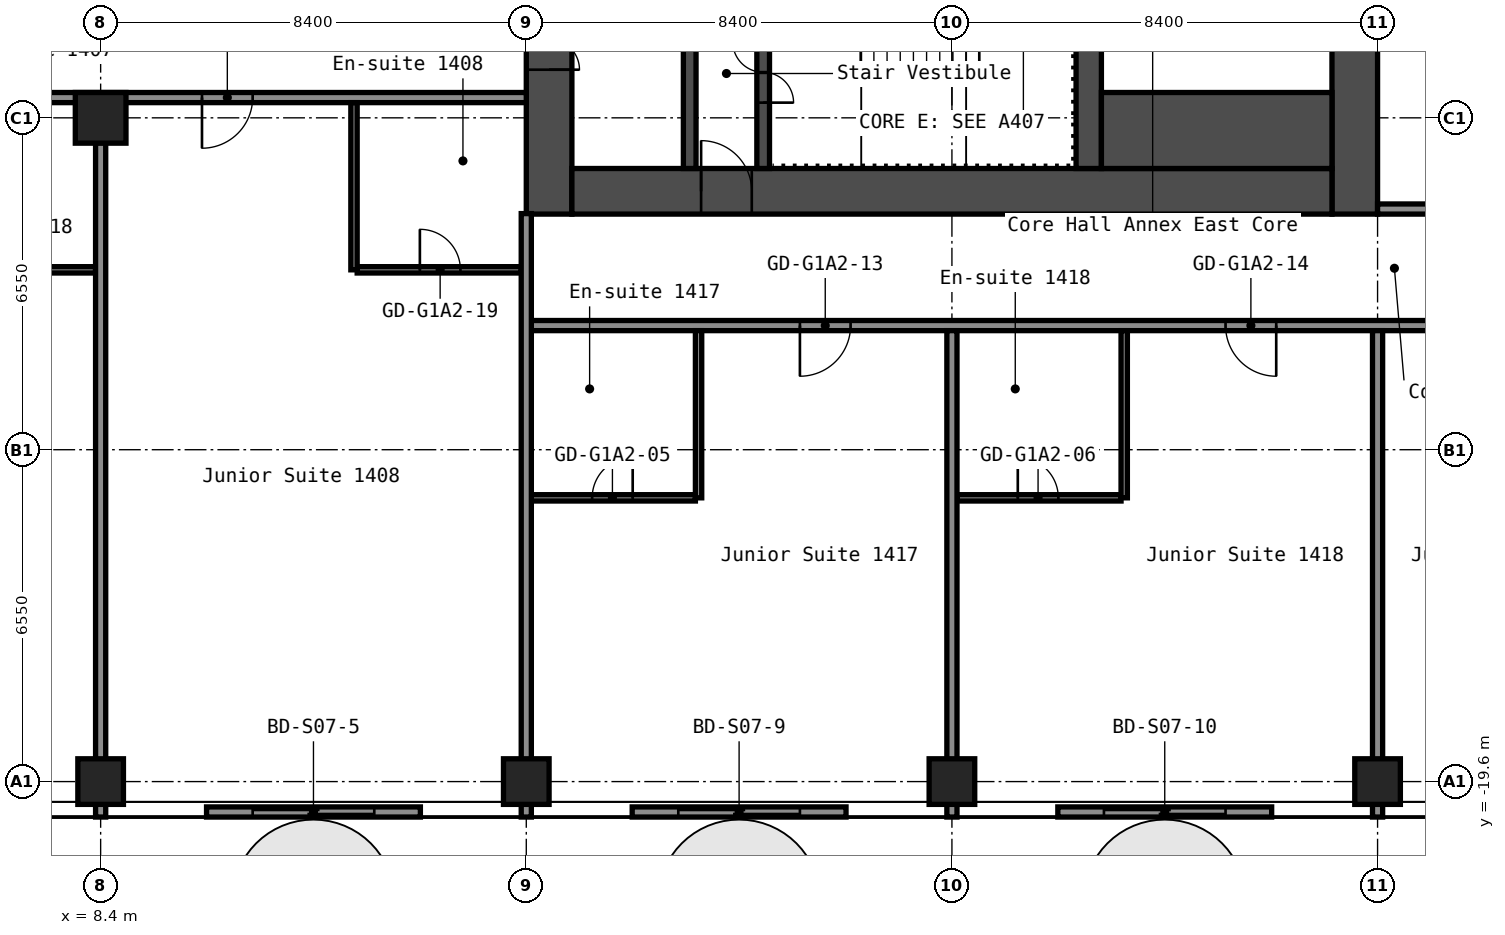
"""IFC4 building model, lengths in metres.
Left out: names, types, materials, properties, quantities, classifications, styles, units other than length and angle.
Written with IfcOpenShell. Run it as: python <this file> out.ifc"""

import sys

from ifc_helpers import new_model, si_unit, direction, frame, frame_2d, origin, origin_2d, place, context, subcontext, project, spatial, rectangle, hollow_rectangle, extrude, element, fill, save


model = new_model("IFC4")
c1 = context("Model", 3, precision=1e-05, world=origin(), true_north=direction((0.0, 1.0)))
c2 = subcontext(c1, "Body", "Model", "MODEL_VIEW")
j1 = project(units=[si_unit("LENGTHUNIT", "METRE"), si_unit("PLANEANGLEUNIT", "RADIAN")], contexts=[c1])
p1 = place(None, origin())
s1 = spatial("IfcSite", under=j1, at=p1, CompositionType="ELEMENT")
p2 = place(p1, origin())
s2 = spatial("IfcBuilding", under=s1, at=p2, CompositionType="ELEMENT")
p3 = place(p2, frame((0.0, 0.0, 51.8)))
s3 = spatial("IfcBuildingStorey", under=s2, at=p3, CompositionType="ELEMENT", Elevation=51.8)
p4 = place(p3, frame((8.4, -19.6, 0.0), z_axis=(0.0, 0.0, 1.0), x_axis=(1.0, 0.0, 0.0)))
e1 = element("IfcColumn", 1, at=p4, inside=s3, PredefinedType="COLUMN", context=c2, shape_type="SweptSolid", body=[
    extrude(hollow_rectangle(XDim=0.9, YDim=0.9, WallThickness=0.036, at=origin_2d()), origin(), (0.0, 0.0, 1.0), 2.8),
])
p5 = place(p3, frame((8.4, -6.5, 0.0), z_axis=(0.0, 0.0, 1.0), x_axis=(1.0, 0.0, 0.0)))
e2 = element("IfcColumn", 2, at=p5, inside=s3, PredefinedType="COLUMN", context=c2, shape_type="SweptSolid", body=[
    extrude(hollow_rectangle(XDim=1.0, YDim=1.0, WallThickness=0.04, at=origin_2d()), origin(), (0.0, 0.0, 1.0), 2.8),
])
for number, where, z_axis, x_axis in (
    (3, (16.8, -19.6, 0.0), (0.0, 0.0, 1.0), (1.0, 0.0, 0.0)),
    (4, (25.2, -19.6, 0.0), (0.0, 0.0, 1.0), (1.0, 0.0, 0.0)),
    (5, (33.6, -19.6, 0.0), (0.0, 0.0, 1.0), (1.0, 0.0, 0.0)),
):
    element("IfcColumn", number, at=place(p3, frame(where, z_axis=z_axis, x_axis=x_axis)), inside=s3, PredefinedType="COLUMN", context=c2, shape_type="SweptSolid", body=[
        extrude(hollow_rectangle(XDim=0.9, YDim=0.9, WallThickness=0.036, at=origin_2d()), origin(), (0.0, 0.0, 1.0), 2.8),
    ])
p6 = place(p3, frame((17.25, -8.4, 0.0), z_axis=(0.0, 0.0, 1.0), x_axis=(0.0, 1.0, 0.0)))
e6 = element("IfcWall", 6, at=p6, inside=s3, PredefinedType="SHEAR", context=c2, shape_type="SweptSolid", body=[
    extrude(rectangle(XDim=16.8, YDim=0.9, at=frame_2d((8.4, 0.0))), origin(), (0.0, 0.0, 1.0), 2.8),
])
p7 = place(p6, frame((12.75, 0.0, 0.0)))
e7 = element("IfcOpeningElement", 7, at=p7, cuts=e6, PredefinedType="OPENING", context=c2, shape_type="SweptSolid", body=[
    extrude(rectangle(XDim=1.2, YDim=2.1, at=frame_2d((0.6, 1.05))), frame((0.0, 0.46, 0.0), z_axis=(0.0, -1.0, 0.0), x_axis=(1.0, 0.0, 0.0)), (0.0, 0.0, 1.0), 0.92),
])
p8 = place(p6, frame((2.85, 0.0, 0.0)))
e8 = element("IfcOpeningElement", 8, at=p8, cuts=e6, PredefinedType="OPENING", context=c2, shape_type="SweptSolid", body=[
    extrude(rectangle(XDim=1.2, YDim=2.1, at=frame_2d((0.6, 1.05))), frame((0.0, 0.46, 0.0), z_axis=(0.0, -1.0, 0.0), x_axis=(1.0, 0.0, 0.0)), (0.0, 0.0, 1.0), 0.92),
])
p9 = place(p3, frame((33.15, -8.4, 0.0), z_axis=(0.0, 0.0, 1.0), x_axis=(0.0, 1.0, 0.0)))
e9 = element("IfcWall", 9, at=p9, inside=s3, PredefinedType="SHEAR", context=c2, shape_type="SweptSolid", body=[
    extrude(rectangle(XDim=16.8, YDim=0.9, at=frame_2d((8.4, 0.0))), origin(), (0.0, 0.0, 1.0), 2.8),
])
p10 = place(p3, frame((17.7, -7.95, 0.0), z_axis=(0.0, 0.0, 1.0), x_axis=(1.0, 0.0, 0.0)))
e10 = element("IfcWall", 10, at=p10, inside=s3, PredefinedType="SHEAR", context=c2, shape_type="SweptSolid", body=[
    extrude(rectangle(XDim=15.0, YDim=0.9, at=frame_2d((7.5, 0.0))), origin(), (0.0, 0.0, 1.0), 2.8),
])
p11 = place(p10, frame((2.55, 0.0, 0.0)))
e11 = element("IfcOpeningElement", 11, at=p11, cuts=e10, PredefinedType="OPENING", context=c2, shape_type="SweptSolid", body=[
    extrude(rectangle(XDim=1.0, YDim=2.1, at=frame_2d((0.5, 1.05))), frame((0.0, 0.46, 0.0), z_axis=(0.0, -1.0, 0.0), x_axis=(1.0, 0.0, 0.0)), (0.0, 0.0, 1.0), 0.92),
])
p12 = place(p3, frame((20.025, -7.5, 0.0), z_axis=(0.0, 0.0, 1.0), x_axis=(0.0, 1.0, 0.0)))
e12 = element("IfcWall", 12, at=p12, inside=s3, PredefinedType="SHEAR", context=c2, shape_type="SweptSolid", body=[
    extrude(rectangle(XDim=6.3, YDim=0.25, at=frame_2d((3.15, 0.0))), origin(), (0.0, 0.0, 1.0), 2.8),
])
p13 = place(p12, frame((2.4, 0.0, 0.0)))
e13 = element("IfcOpeningElement", 13, at=p13, cuts=e12, PredefinedType="OPENING", context=c2, shape_type="SweptSolid", body=[
    extrude(rectangle(XDim=1.0, YDim=2.1, at=frame_2d((0.5, 1.05))), frame((0.0, 0.135, 0.0), z_axis=(0.0, -1.0, 0.0), x_axis=(1.0, 0.0, 0.0)), (0.0, 0.0, 1.0), 0.27),
])
p14 = place(p3, frame((21.475, -7.5, 0.0), z_axis=(0.0, 0.0, 1.0), x_axis=(0.0, 1.0, 0.0)))
e14 = element("IfcWall", 14, at=p14, inside=s3, PredefinedType="SHEAR", context=c2, shape_type="SweptSolid", body=[
    extrude(rectangle(XDim=3.75, YDim=0.25, at=frame_2d((1.875, 0.0))), origin(), (0.0, 0.0, 1.0), 2.8),
])
p15 = place(p14, frame((1.3, 0.0, 0.0)))
e15 = element("IfcOpeningElement", 15, at=p15, cuts=e14, PredefinedType="OPENING", context=c2, shape_type="SweptSolid", body=[
    extrude(rectangle(XDim=1.2, YDim=2.1, at=frame_2d((0.6, 1.05))), frame((0.0, 0.135, 0.0), z_axis=(0.0, -1.0, 0.0), x_axis=(1.0, 0.0, 0.0)), (0.0, 0.0, 1.0), 0.27),
])
p16 = place(p3, frame((27.9, -7.5, 0.0), z_axis=(0.0, 0.0, 1.0), x_axis=(0.0, 1.0, 0.0)))
e16 = element("IfcWall", 16, at=p16, inside=s3, PredefinedType="SHEAR", context=c2, shape_type="SweptSolid", body=[
    extrude(rectangle(XDim=3.75, YDim=0.5, at=frame_2d((1.875, 0.0))), origin(), (0.0, 0.0, 1.0), 2.8),
])
p17 = place(p3, frame((28.15, -6.75, 0.0), z_axis=(0.0, 0.0, 1.0), x_axis=(1.0, 0.0, 0.0)))
e17 = element("IfcWall", 17, at=p17, inside=s3, PredefinedType="SHEAR", context=c2, shape_type="SweptSolid", body=[
    extrude(rectangle(XDim=4.55, YDim=1.5, at=frame_2d((2.275, 0.0))), origin(), (0.0, 0.0, 1.0), 2.8),
])
p18 = place(p3, frame((16.9, -14.0, 0.0), z_axis=(0.0, 0.0, 1.0), x_axis=(1.0, 0.0, 0.0)))
e18 = element("IfcWall", 18, at=p18, inside=s3, PredefinedType="PARTITIONING", context=c2, shape_type="SweptSolid", body=[
    extrude(rectangle(XDim=3.238, YDim=0.125, at=frame_2d((1.619, 0.0))), origin(), (0.0, 0.0, 1.0), 2.8),
])
p19 = place(p18, frame((1.2, 0.0, 0.0)))
e19 = element("IfcOpeningElement", 19, at=p19, cuts=e18, PredefinedType="OPENING", context=c2, shape_type="SweptSolid", body=[
    extrude(rectangle(XDim=0.8, YDim=2.1, at=frame_2d((0.4, 1.05))), frame((0.0, 0.073, 0.0), z_axis=(0.0, -1.0, 0.0), x_axis=(1.0, 0.0, 0.0)), (0.0, 0.0, 1.0), 0.145),
])
p20 = place(p3, frame((25.3, -14.0, 0.0), z_axis=(0.0, 0.0, 1.0), x_axis=(1.0, 0.0, 0.0)))
e20 = element("IfcWall", 20, at=p20, inside=s3, PredefinedType="PARTITIONING", context=c2, shape_type="SweptSolid", body=[
    extrude(rectangle(XDim=3.238, YDim=0.125, at=frame_2d((1.619, 0.0))), origin(), (0.0, 0.0, 1.0), 2.8),
])
p21 = place(p20, frame((1.2, 0.0, 0.0)))
e21 = element("IfcOpeningElement", 21, at=p21, cuts=e20, PredefinedType="OPENING", context=c2, shape_type="SweptSolid", body=[
    extrude(rectangle(XDim=0.8, YDim=2.1, at=frame_2d((0.4, 1.05))), frame((0.0, 0.073, 0.0), z_axis=(0.0, -1.0, 0.0), x_axis=(1.0, 0.0, 0.0)), (0.0, 0.0, 1.0), 0.145),
])
p22 = place(p3, frame((16.8, -10.6, 0.0), z_axis=(0.0, 0.0, 1.0), x_axis=(1.0, 0.0, 0.0)))
e22 = element("IfcWall", 22, at=p22, inside=s3, PredefinedType="PARTITIONING", context=c2, shape_type="SweptSolid", body=[
    extrude(rectangle(XDim=34.3, YDim=0.2, at=frame_2d((17.15, 0.0))), origin(), (0.0, 0.0, 1.0), 2.8),
])
p23 = place(p22, frame((5.4, 0.0, 0.0)))
e23 = element("IfcOpeningElement", 23, at=p23, cuts=e22, PredefinedType="OPENING", context=c2, shape_type="SweptSolid", body=[
    extrude(rectangle(XDim=1.0, YDim=2.1, at=frame_2d((0.5, 1.05))), frame((0.0, 0.11, 0.0), z_axis=(0.0, -1.0, 0.0), x_axis=(1.0, 0.0, 0.0)), (0.0, 0.0, 1.0), 0.22),
])
p24 = place(p22, frame((13.8, 0.0, 0.0)))
e24 = element("IfcOpeningElement", 24, at=p24, cuts=e22, PredefinedType="OPENING", context=c2, shape_type="SweptSolid", body=[
    extrude(rectangle(XDim=1.0, YDim=2.1, at=frame_2d((0.5, 1.05))), frame((0.0, 0.11, 0.0), z_axis=(0.0, -1.0, 0.0), x_axis=(1.0, 0.0, 0.0)), (0.0, 0.0, 1.0), 0.22),
])
p25 = place(p22, frame((18.8, 0.0, 0.0)))
e25 = element("IfcOpeningElement", 25, at=p25, cuts=e22, PredefinedType="OPENING", context=c2, shape_type="SweptSolid", body=[
    extrude(rectangle(XDim=1.0, YDim=2.1, at=frame_2d((0.5, 1.05))), frame((0.0, 0.11, 0.0), z_axis=(0.0, -1.0, 0.0), x_axis=(1.0, 0.0, 0.0)), (0.0, 0.0, 1.0), 0.22),
])
p26 = place(p22, frame((30.8, 0.0, 0.0)))
e26 = element("IfcOpeningElement", 26, at=p26, cuts=e22, PredefinedType="OPENING", context=c2, shape_type="SweptSolid", body=[
    extrude(rectangle(XDim=1.0, YDim=2.1, at=frame_2d((0.5, 1.05))), frame((0.0, 0.11, 0.0), z_axis=(0.0, -1.0, 0.0), x_axis=(1.0, 0.0, 0.0)), (0.0, 0.0, 1.0), 0.22),
])
p27 = place(p3, frame((5.062, -9.5, 0.0), z_axis=(0.0, 0.0, 1.0), x_axis=(1.0, 0.0, 0.0)))
e27 = element("IfcWall", 27, at=p27, inside=s3, PredefinedType="PARTITIONING", context=c2, shape_type="SweptSolid", body=[
    extrude(rectangle(XDim=3.238, YDim=0.125, at=frame_2d((1.619, 0.0))), origin(), (0.0, 0.0, 1.0), 2.8),
])
p28 = place(p27, frame((1.238, 0.0, 0.0)))
e28 = element("IfcOpeningElement", 28, at=p28, cuts=e27, PredefinedType="OPENING", context=c2, shape_type="SweptSolid", body=[
    extrude(rectangle(XDim=0.8, YDim=2.1, at=frame_2d((0.4, 1.05))), frame((0.0, 0.073, 0.0), z_axis=(0.0, -1.0, 0.0), x_axis=(1.0, 0.0, 0.0)), (0.0, 0.0, 1.0), 0.145),
])
p29 = place(p3, frame((13.462, -9.5, 0.0), z_axis=(0.0, 0.0, 1.0), x_axis=(1.0, 0.0, 0.0)))
e29 = element("IfcWall", 29, at=p29, inside=s3, PredefinedType="PARTITIONING", context=c2, shape_type="SweptSolid", body=[
    extrude(rectangle(XDim=3.238, YDim=0.125, at=frame_2d((1.619, 0.0))), origin(), (0.0, 0.0, 1.0), 2.8),
])
p30 = place(p29, frame((1.238, 0.0, 0.0)))
e30 = element("IfcOpeningElement", 30, at=p30, cuts=e29, PredefinedType="OPENING", context=c2, shape_type="SweptSolid", body=[
    extrude(rectangle(XDim=0.8, YDim=2.1, at=frame_2d((0.4, 1.05))), frame((0.0, 0.073, 0.0), z_axis=(0.0, -1.0, 0.0), x_axis=(1.0, 0.0, 0.0)), (0.0, 0.0, 1.0), 0.145),
])
p31 = place(p3, frame((33.6, -8.3, 0.0), z_axis=(0.0, 0.0, 1.0), x_axis=(1.0, 0.0, 0.0)))
e31 = element("IfcWall", 31, at=p31, inside=s3, PredefinedType="PARTITIONING", context=c2, shape_type="SweptSolid", body=[
    extrude(rectangle(XDim=15.0, YDim=0.2, at=frame_2d((7.5, 0.0))), origin(), (0.0, 0.0, 1.0), 2.8),
])
p32 = place(p31, frame((2.0, 0.0, 0.0)))
e32 = element("IfcOpeningElement", 32, at=p32, cuts=e31, PredefinedType="OPENING", context=c2, shape_type="SweptSolid", body=[
    extrude(rectangle(XDim=1.0, YDim=2.1, at=frame_2d((0.5, 1.05))), frame((0.0, 0.11, 0.0), z_axis=(0.0, -1.0, 0.0), x_axis=(1.0, 0.0, 0.0)), (0.0, 0.0, 1.0), 0.22),
])
p33 = place(p31, frame((12.85, 0.0, 0.0)))
e33 = element("IfcOpeningElement", 33, at=p33, cuts=e31, PredefinedType="OPENING", context=c2, shape_type="SweptSolid", body=[
    extrude(rectangle(XDim=1.0, YDim=2.1, at=frame_2d((0.5, 1.05))), frame((0.0, 0.11, 0.0), z_axis=(0.0, -1.0, 0.0), x_axis=(1.0, 0.0, 0.0)), (0.0, 0.0, 1.0), 0.22),
])
p34 = place(p3, frame((-16.8, -6.1, 0.0), z_axis=(0.0, 0.0, 1.0), x_axis=(1.0, 0.0, 0.0)))
e34 = element("IfcWall", 34, at=p34, inside=s3, PredefinedType="PARTITIONING", context=c2, shape_type="SweptSolid", body=[
    extrude(rectangle(XDim=33.6, YDim=0.2, at=frame_2d((16.8, 0.0))), origin(), (0.0, 0.0, 1.0), 2.8),
])
p35 = place(p34, frame((2.0, 0.0, 0.0)))
e35 = element("IfcOpeningElement", 35, at=p35, cuts=e34, PredefinedType="OPENING", context=c2, shape_type="SweptSolid", body=[
    extrude(rectangle(XDim=1.0, YDim=2.1, at=frame_2d((0.5, 1.05))), frame((0.0, 0.11, 0.0), z_axis=(0.0, -1.0, 0.0), x_axis=(1.0, 0.0, 0.0)), (0.0, 0.0, 1.0), 0.22),
])
p36 = place(p34, frame((9.46, 0.0, 0.0)))
e36 = element("IfcOpeningElement", 36, at=p36, cuts=e34, PredefinedType="OPENING", context=c2, shape_type="SweptSolid", body=[
    extrude(rectangle(XDim=0.9, YDim=2.1, at=frame_2d((0.45, 1.05))), frame((0.0, 0.11, 0.0), z_axis=(0.0, -1.0, 0.0), x_axis=(1.0, 0.0, 0.0)), (0.0, 0.0, 1.0), 0.22),
])
p37 = place(p34, frame((13.66, 0.0, 0.0)))
e37 = element("IfcOpeningElement", 37, at=p37, cuts=e34, PredefinedType="OPENING", context=c2, shape_type="SweptSolid", body=[
    extrude(rectangle(XDim=0.9, YDim=2.1, at=frame_2d((0.45, 1.05))), frame((0.0, 0.11, 0.0), z_axis=(0.0, -1.0, 0.0), x_axis=(1.0, 0.0, 0.0)), (0.0, 0.0, 1.0), 0.22),
])
p38 = place(p34, frame((18.8, 0.0, 0.0)))
e38 = element("IfcOpeningElement", 38, at=p38, cuts=e34, PredefinedType="OPENING", context=c2, shape_type="SweptSolid", body=[
    extrude(rectangle(XDim=1.0, YDim=2.1, at=frame_2d((0.5, 1.05))), frame((0.0, 0.11, 0.0), z_axis=(0.0, -1.0, 0.0), x_axis=(1.0, 0.0, 0.0)), (0.0, 0.0, 1.0), 0.22),
])
p39 = place(p34, frame((27.2, 0.0, 0.0)))
e39 = element("IfcOpeningElement", 39, at=p39, cuts=e34, PredefinedType="OPENING", context=c2, shape_type="SweptSolid", body=[
    extrude(rectangle(XDim=1.0, YDim=2.1, at=frame_2d((0.5, 1.05))), frame((0.0, 0.11, 0.0), z_axis=(0.0, -1.0, 0.0), x_axis=(1.0, 0.0, 0.0)), (0.0, 0.0, 1.0), 0.22),
])
p40 = place(p3, frame((8.4, -20.3, 0.0), z_axis=(0.0, 0.0, 1.0), x_axis=(0.0, 1.0, 0.0)))
e40 = element("IfcWall", 40, at=p40, inside=s3, PredefinedType="PARTITIONING", context=c2, shape_type="SweptSolid", body=[
    extrude(rectangle(XDim=13.31, YDim=0.2, at=frame_2d((6.655, 0.0))), origin(), (0.0, 0.0, 1.0), 2.8),
])
p41 = place(p3, frame((13.4, -9.5, 0.0), z_axis=(0.0, 0.0, 1.0), x_axis=(0.0, 1.0, 0.0)))
e41 = element("IfcWall", 41, at=p41, inside=s3, PredefinedType="PARTITIONING", context=c2, shape_type="SweptSolid", body=[
    extrude(rectangle(XDim=3.3, YDim=0.125, at=frame_2d((1.65, 0.0))), origin(), (0.0, 0.0, 1.0), 2.8),
])
p42 = place(p3, frame((16.8, -20.3, 0.0), z_axis=(0.0, 0.0, 1.0), x_axis=(0.0, 1.0, 0.0)))
e42 = element("IfcWall", 42, at=p42, inside=s3, PredefinedType="PARTITIONING", context=c2, shape_type="SweptSolid", body=[
    extrude(rectangle(XDim=11.91, YDim=0.2, at=frame_2d((5.955, 0.0))), origin(), (0.0, 0.0, 1.0), 2.8),
])
p43 = place(p3, frame((20.2, -14.0, 0.0), z_axis=(0.0, 0.0, 1.0), x_axis=(0.0, 1.0, 0.0)))
e43 = element("IfcWall", 43, at=p43, inside=s3, PredefinedType="PARTITIONING", context=c2, shape_type="SweptSolid", body=[
    extrude(rectangle(XDim=3.3, YDim=0.125, at=frame_2d((1.65, 0.0))), origin(), (0.0, 0.0, 1.0), 2.8),
])
p44 = place(p3, frame((25.2, -20.3, 0.0), z_axis=(0.0, 0.0, 1.0), x_axis=(0.0, 1.0, 0.0)))
e44 = element("IfcWall", 44, at=p44, inside=s3, PredefinedType="PARTITIONING", context=c2, shape_type="SweptSolid", body=[
    extrude(rectangle(XDim=9.6, YDim=0.2, at=frame_2d((4.8, 0.0))), origin(), (0.0, 0.0, 1.0), 2.8),
])
p45 = place(p3, frame((28.6, -14.0, 0.0), z_axis=(0.0, 0.0, 1.0), x_axis=(0.0, 1.0, 0.0)))
e45 = element("IfcWall", 45, at=p45, inside=s3, PredefinedType="PARTITIONING", context=c2, shape_type="SweptSolid", body=[
    extrude(rectangle(XDim=3.3, YDim=0.125, at=frame_2d((1.65, 0.0))), origin(), (0.0, 0.0, 1.0), 2.8),
])
p46 = place(p3, frame((33.6, -20.3, 0.0), z_axis=(0.0, 0.0, 1.0), x_axis=(0.0, 1.0, 0.0)))
e46 = element("IfcWall", 46, at=p46, inside=s3, PredefinedType="PARTITIONING", context=c2, shape_type="SweptSolid", body=[
    extrude(rectangle(XDim=9.6, YDim=0.2, at=frame_2d((4.8, 0.0))), origin(), (0.0, 0.0, 1.0), 2.8),
])
p47 = place(p3, frame((10.49, -20.2, 0.0), z_axis=(0.0, 0.0, 1.0), x_axis=(1.0, 0.0, 0.0)))
p48 = place(p47, frame((0.91, 0.0, 0.0)))
p49 = place(p48, frame((2.4, 0.0, 0.0), z_axis=(0.0, 0.0, 1.0), x_axis=(-1.0, 0.0, 0.0)))
e47 = element("IfcDoor", 47, at=p49, inside=s3, OperationType="SLIDING_TO_LEFT", PredefinedType="DOOR", context=c2, shape_type="SweptSolid", body=[
    extrude(rectangle(XDim=2.4, YDim=2.2, at=frame_2d((1.2, 1.1))), frame((0.0, 0.025, 0.0), z_axis=(0.0, -1.0, 0.0), x_axis=(1.0, 0.0, 0.0)), (0.0, 0.0, 1.0), 0.05),
])
p50 = place(p3, frame((18.89, -20.2, 0.0), z_axis=(0.0, 0.0, 1.0), x_axis=(1.0, 0.0, 0.0)))
p51 = place(p50, frame((0.91, 0.0, 0.0)))
p52 = place(p51, frame((2.4, 0.0, 0.0), z_axis=(0.0, 0.0, 1.0), x_axis=(-1.0, 0.0, 0.0)))
e48 = element("IfcDoor", 48, at=p52, inside=s3, OperationType="SLIDING_TO_LEFT", PredefinedType="DOOR", context=c2, shape_type="SweptSolid", body=[
    extrude(rectangle(XDim=2.4, YDim=2.2, at=frame_2d((1.2, 1.1))), frame((0.0, 0.025, 0.0), z_axis=(0.0, -1.0, 0.0), x_axis=(1.0, 0.0, 0.0)), (0.0, 0.0, 1.0), 0.05),
])
p53 = place(p3, frame((27.29, -20.2, 0.0), z_axis=(0.0, 0.0, 1.0), x_axis=(1.0, 0.0, 0.0)))
p54 = place(p53, frame((0.91, 0.0, 0.0)))
p55 = place(p54, frame((2.4, 0.0, 0.0), z_axis=(0.0, 0.0, 1.0), x_axis=(-1.0, 0.0, 0.0)))
e49 = element("IfcDoor", 49, at=p55, inside=s3, OperationType="SLIDING_TO_LEFT", PredefinedType="DOOR", context=c2, shape_type="SweptSolid", body=[
    extrude(rectangle(XDim=2.4, YDim=2.2, at=frame_2d((1.2, 1.1))), frame((0.0, 0.025, 0.0), z_axis=(0.0, -1.0, 0.0), x_axis=(1.0, 0.0, 0.0)), (0.0, 0.0, 1.0), 0.05),
])
p56 = place(p8, origin())
e50 = element("IfcDoor", 50, at=p56, inside=s3, OperationType="DOUBLE_DOOR_SINGLE_SWING", PredefinedType="DOOR", context=c2, shape_type="SweptSolid", body=[
    extrude(rectangle(XDim=1.2, YDim=2.1, at=frame_2d((0.6, 1.05))), frame((0.0, 0.025, 0.0), z_axis=(0.0, -1.0, 0.0), x_axis=(1.0, 0.0, 0.0)), (0.0, 0.0, 1.0), 0.05),
])
fill(e8, e50)
p57 = place(p11, origin())
e51 = element("IfcDoor", 51, at=p57, inside=s3, OperationType="SINGLE_SWING_RIGHT", PredefinedType="DOOR", context=c2, shape_type="SweptSolid", body=[
    extrude(rectangle(XDim=1.0, YDim=2.1, at=frame_2d((0.5, 1.05))), frame((0.0, 0.025, 0.0), z_axis=(0.0, -1.0, 0.0), x_axis=(1.0, 0.0, 0.0)), (0.0, 0.0, 1.0), 0.05),
])
fill(e11, e51)
p58 = place(p15, origin())
e52 = element("IfcDoor", 52, at=p58, inside=s3, OperationType="DOUBLE_DOOR_SINGLE_SWING", PredefinedType="DOOR", context=c2, shape_type="SweptSolid", body=[
    extrude(rectangle(XDim=1.2, YDim=2.1, at=frame_2d((0.6, 1.05))), frame((0.0, 0.025, 0.0), z_axis=(0.0, -1.0, 0.0), x_axis=(1.0, 0.0, 0.0)), (0.0, 0.0, 1.0), 0.05),
])
fill(e15, e52)
p59 = place(p19, origin())
e53 = element("IfcDoor", 53, at=p59, inside=s3, OperationType="SINGLE_SWING_LEFT", PredefinedType="DOOR", context=c2, shape_type="SweptSolid", body=[
    extrude(rectangle(XDim=0.8, YDim=2.1, at=frame_2d((0.4, 1.05))), frame((0.0, 0.025, 0.0), z_axis=(0.0, -1.0, 0.0), x_axis=(1.0, 0.0, 0.0)), (0.0, 0.0, 1.0), 0.05),
])
fill(e19, e53)
p60 = place(p21, origin())
e54 = element("IfcDoor", 54, at=p60, inside=s3, OperationType="SINGLE_SWING_RIGHT", PredefinedType="DOOR", context=c2, shape_type="SweptSolid", body=[
    extrude(rectangle(XDim=0.8, YDim=2.1, at=frame_2d((0.4, 1.05))), frame((0.0, 0.025, 0.0), z_axis=(0.0, -1.0, 0.0), x_axis=(1.0, 0.0, 0.0)), (0.0, 0.0, 1.0), 0.05),
])
fill(e21, e54)
p61 = place(p23, origin())
e55 = element("IfcDoor", 55, at=p61, inside=s3, OperationType="SINGLE_SWING_LEFT", PredefinedType="DOOR", context=c2, shape_type="SweptSolid", body=[
    extrude(rectangle(XDim=1.0, YDim=2.1, at=frame_2d((0.5, 1.05))), frame((0.0, 0.025, 0.0), z_axis=(0.0, -1.0, 0.0), x_axis=(1.0, 0.0, 0.0)), (0.0, 0.0, 1.0), 0.05),
])
fill(e23, e55)
p62 = place(p24, origin())
e56 = element("IfcDoor", 56, at=p62, inside=s3, OperationType="SINGLE_SWING_RIGHT", PredefinedType="DOOR", context=c2, shape_type="SweptSolid", body=[
    extrude(rectangle(XDim=1.0, YDim=2.1, at=frame_2d((0.5, 1.05))), frame((0.0, 0.025, 0.0), z_axis=(0.0, -1.0, 0.0), x_axis=(1.0, 0.0, 0.0)), (0.0, 0.0, 1.0), 0.05),
])
fill(e24, e56)
p63 = place(p30, origin())
e57 = element("IfcDoor", 57, at=p63, inside=s3, OperationType="SINGLE_SWING_RIGHT", PredefinedType="DOOR", context=c2, shape_type="SweptSolid", body=[
    extrude(rectangle(XDim=0.8, YDim=2.1, at=frame_2d((0.4, 1.05))), frame((0.0, 0.025, 0.0), z_axis=(0.0, -1.0, 0.0), x_axis=(1.0, 0.0, 0.0)), (0.0, 0.0, 1.0), 0.05),
])
fill(e30, e57)
p64 = place(p39, origin())
e58 = element("IfcDoor", 58, at=p64, inside=s3, OperationType="SINGLE_SWING_LEFT", PredefinedType="DOOR", context=c2, shape_type="SweptSolid", body=[
    extrude(rectangle(XDim=1.0, YDim=2.1, at=frame_2d((0.5, 1.05))), frame((0.0, 0.025, 0.0), z_axis=(0.0, -1.0, 0.0), x_axis=(1.0, 0.0, 0.0)), (0.0, 0.0, 1.0), 0.05),
])
fill(e39, e58)
save(model, sys.argv[1])
